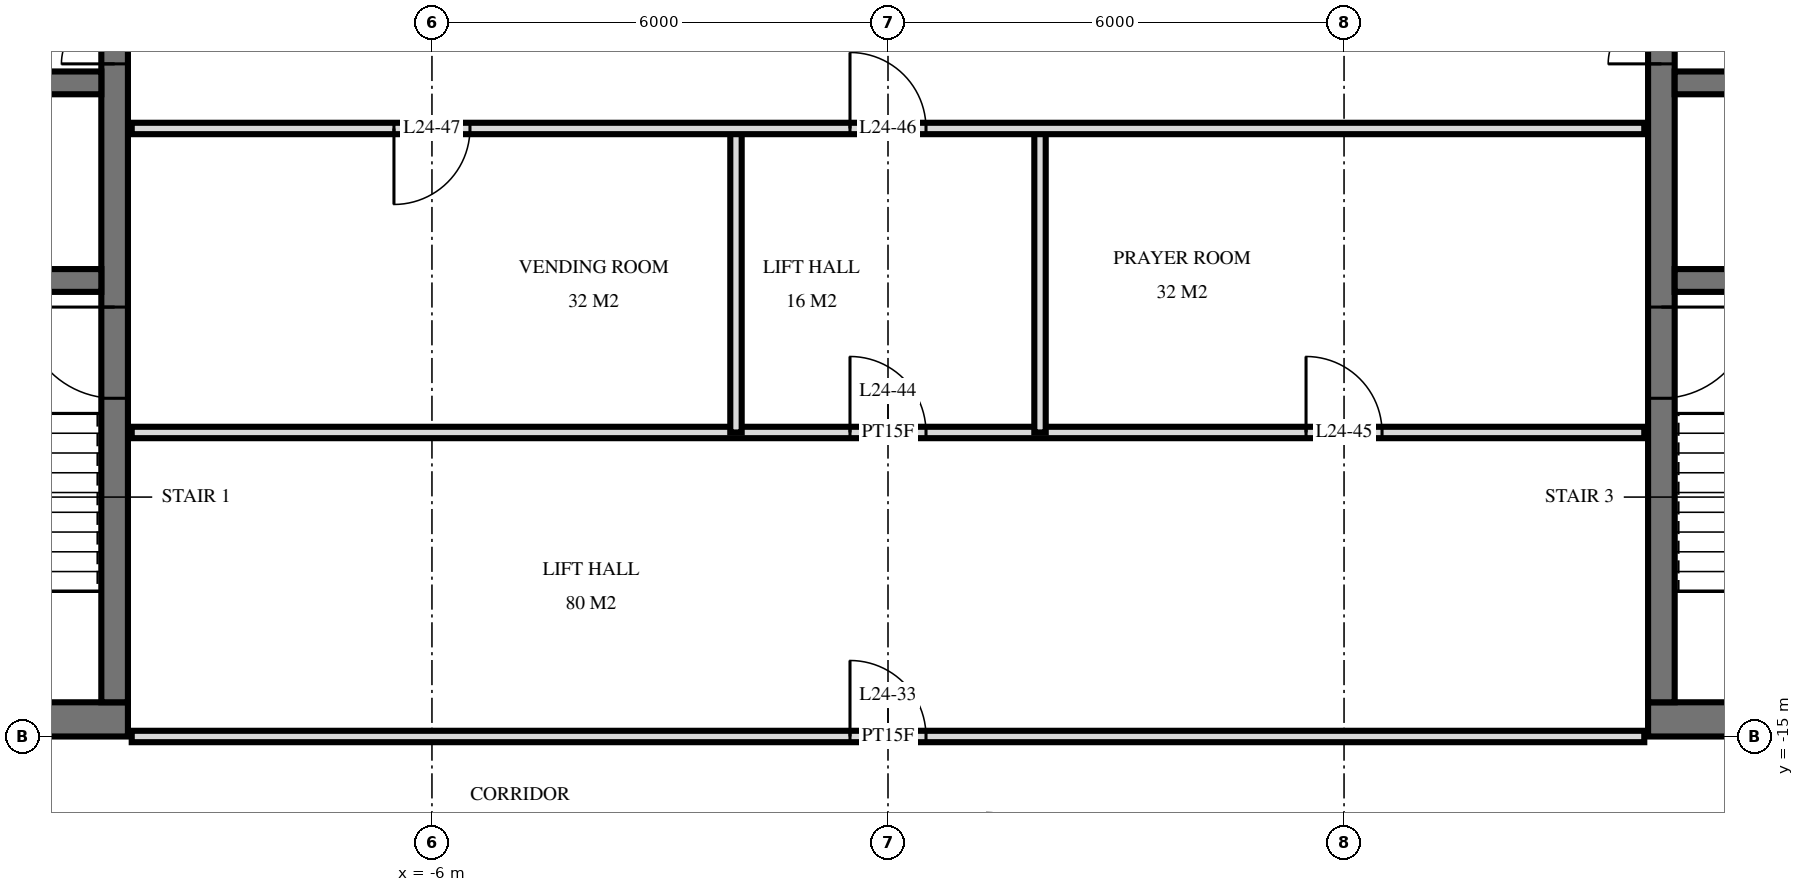
"""IFC4 building model, lengths in metres.
Left out: names, types, materials, properties, quantities, classifications, styles, units other than length and angle.
Written with IfcOpenShell. Run it as: python <this file> out.ifc"""

import sys

from ifc_helpers import new_model, si_unit, direction, frame, frame_2d, origin, place, context, subcontext, project, spatial, rectangle, extrude, element, fill, save


model = new_model("IFC4")
c1 = context("Model", 3, precision=1e-05, world=origin(), true_north=direction((0.0, 1.0)))
c2 = subcontext(c1, "Body", "Model", "MODEL_VIEW")
j1 = project(units=[si_unit("LENGTHUNIT", "METRE"), si_unit("PLANEANGLEUNIT", "RADIAN")], contexts=[c1])
p1 = place(None, origin())
s1 = spatial("IfcSite", under=j1, at=p1, CompositionType="ELEMENT")
p2 = place(p1, origin())
s2 = spatial("IfcBuilding", under=s1, at=p2, CompositionType="ELEMENT")
p3 = place(p2, frame((0.0, 0.0, 96.0)))
s3 = spatial("IfcBuildingStorey", under=s2, at=p3, CompositionType="ELEMENT", Elevation=96.0)
p4 = place(p3, frame((-29.5, -14.775, 0.0), z_axis=(0.0, 0.0, 1.0), x_axis=(1.0, 0.0, 0.0)))
e1 = element("IfcWall", 1, at=p4, inside=s3, PredefinedType="SHEAR", context=c2, shape_type="SweptSolid", body=[
    extrude(rectangle(XDim=19.5, YDim=0.45, at=frame_2d((9.75, 0.0))), origin(), (0.0, 0.0, 1.0), 3.6),
])
p5 = place(p4, frame((11.2, 0.0, 0.0)))
e2 = element("IfcOpeningElement", 2, at=p5, cuts=e1, PredefinedType="OPENING", context=c2, shape_type="SweptSolid", body=[
    extrude(rectangle(XDim=1.2, YDim=2.1, at=frame_2d((0.6, 1.05))), frame((0.0, 0.235, 0.0), z_axis=(0.0, -1.0, 0.0), x_axis=(1.0, 0.0, 0.0)), (0.0, 0.0, 1.0), 0.47),
])
p6 = place(p4, frame((14.25, 0.0, 0.0)))
e3 = element("IfcOpeningElement", 3, at=p6, cuts=e1, PredefinedType="OPENING", context=c2, shape_type="SweptSolid", body=[
    extrude(rectangle(XDim=1.1, YDim=2.1, at=frame_2d((0.55, 1.05))), frame((0.0, 0.235, 0.0), z_axis=(0.0, -1.0, 0.0), x_axis=(1.0, 0.0, 0.0)), (0.0, 0.0, 1.0), 0.47),
])
p7 = place(p4, frame((8.5, 0.0, 0.0)))
e4 = element("IfcOpeningElement", 4, at=p7, cuts=e1, PredefinedType="OPENING", context=c2, shape_type="SweptSolid", body=[
    extrude(rectangle(XDim=0.9, YDim=2.1, at=frame_2d((0.45, 1.05))), frame((0.0, 0.235, 0.0), z_axis=(0.0, -1.0, 0.0), x_axis=(1.0, 0.0, 0.0)), (0.0, 0.0, 1.0), 0.47),
])
p8 = place(p4, frame((6.05, 0.0, 0.0)))
e5 = element("IfcOpeningElement", 5, at=p8, cuts=e1, PredefinedType="OPENING", context=c2, shape_type="SweptSolid", body=[
    extrude(rectangle(XDim=1.0, YDim=2.1, at=frame_2d((0.5, 1.05))), frame((0.0, 0.235, 0.0), z_axis=(0.0, -1.0, 0.0), x_axis=(1.0, 0.0, 0.0)), (0.0, 0.0, 1.0), 0.47),
])
p9 = place(p4, frame((3.413, 0.0, 0.0)))
e6 = element("IfcOpeningElement", 6, at=p9, cuts=e1, PredefinedType="OPENING", context=c2, shape_type="SweptSolid", body=[
    extrude(rectangle(XDim=1.0, YDim=2.1, at=frame_2d((0.5, 1.05))), frame((0.0, 0.235, 0.0), z_axis=(0.0, -1.0, 0.0), x_axis=(1.0, 0.0, 0.0)), (0.0, 0.0, 1.0), 0.47),
])
p10 = place(p4, frame((1.087, 0.0, 0.0)))
e7 = element("IfcOpeningElement", 7, at=p10, cuts=e1, PredefinedType="OPENING", context=c2, shape_type="SweptSolid", body=[
    extrude(rectangle(XDim=1.0, YDim=2.1, at=frame_2d((0.5, 1.05))), frame((0.0, 0.235, 0.0), z_axis=(0.0, -1.0, 0.0), x_axis=(1.0, 0.0, 0.0)), (0.0, 0.0, 1.0), 0.47),
])
p11 = place(p3, frame((-10.175, -14.55, 0.0), z_axis=(0.0, 0.0, 1.0), x_axis=(0.0, 1.0, 0.0)))
e8 = element("IfcWall", 8, at=p11, inside=s3, PredefinedType="SHEAR", context=c2, shape_type="SweptSolid", body=[
    extrude(rectangle(XDim=14.1, YDim=0.35, at=frame_2d((7.05, 0.0))), origin(), (0.0, 0.0, 1.0), 3.6),
])
p12 = place(p11, frame((8.4, 0.0, 0.0)))
e9 = element("IfcOpeningElement", 9, at=p12, cuts=e8, PredefinedType="OPENING", context=c2, shape_type="SweptSolid", body=[
    extrude(rectangle(XDim=1.4, YDim=2.4, at=frame_2d((0.7, 1.2))), frame((0.0, 0.185, 0.0), z_axis=(0.0, -1.0, 0.0), x_axis=(1.0, 0.0, 0.0)), (0.0, 0.0, 1.0), 0.37),
])
p13 = place(p11, frame((10.0, 0.0, 0.0)))
e10 = element("IfcOpeningElement", 10, at=p13, cuts=e8, PredefinedType="OPENING", context=c2, shape_type="SweptSolid", body=[
    extrude(rectangle(XDim=1.4, YDim=2.4, at=frame_2d((0.7, 1.2))), frame((0.0, 0.185, 0.0), z_axis=(0.0, -1.0, 0.0), x_axis=(1.0, 0.0, 0.0)), (0.0, 0.0, 1.0), 0.37),
])
p14 = place(p11, frame((4.0, 0.0, 0.0)))
e11 = element("IfcOpeningElement", 11, at=p14, cuts=e8, PredefinedType="OPENING", context=c2, shape_type="SweptSolid", body=[
    extrude(rectangle(XDim=1.2, YDim=2.1, at=frame_2d((0.6, 1.05))), frame((0.0, 0.185, 0.0), z_axis=(0.0, -1.0, 0.0), x_axis=(1.0, 0.0, 0.0)), (0.0, 0.0, 1.0), 0.37),
])
p15 = place(p3, frame((-29.05, -6.4, 0.0), z_axis=(0.0, 0.0, 1.0), x_axis=(1.0, 0.0, 0.0)))
e12 = element("IfcWall", 12, at=p15, inside=s3, PredefinedType="SHEAR", context=c2, shape_type="SweptSolid", body=[
    extrude(rectangle(XDim=18.7, YDim=0.3, at=frame_2d((9.35, 0.0))), origin(), (0.0, 0.0, 1.0), 3.6),
])
p16 = place(p15, frame((2.95, 0.0, 0.0)))
e13 = element("IfcOpeningElement", 13, at=p16, cuts=e12, PredefinedType="OPENING", context=c2, shape_type="SweptSolid", body=[
    extrude(rectangle(XDim=1.1, YDim=2.1, at=frame_2d((0.55, 1.05))), frame((0.0, 0.16, 0.0), z_axis=(0.0, -1.0, 0.0), x_axis=(1.0, 0.0, 0.0)), (0.0, 0.0, 1.0), 0.32),
])
p17 = place(p15, frame((0.55, 0.0, 0.0)))
e14 = element("IfcOpeningElement", 14, at=p17, cuts=e12, PredefinedType="OPENING", context=c2, shape_type="SweptSolid", body=[
    extrude(rectangle(XDim=1.1, YDim=2.1, at=frame_2d((0.55, 1.05))), frame((0.0, 0.16, 0.0), z_axis=(0.0, -1.0, 0.0), x_axis=(1.0, 0.0, 0.0)), (0.0, 0.0, 1.0), 0.32),
])
p18 = place(p15, frame((10.8, 0.0, 0.0)))
e15 = element("IfcOpeningElement", 15, at=p18, cuts=e12, PredefinedType="OPENING", context=c2, shape_type="SweptSolid", body=[
    extrude(rectangle(XDim=1.1, YDim=2.1, at=frame_2d((0.55, 1.05))), frame((0.0, 0.16, 0.0), z_axis=(0.0, -1.0, 0.0), x_axis=(1.0, 0.0, 0.0)), (0.0, 0.0, 1.0), 0.32),
])
p19 = place(p15, frame((5.6, 0.0, 0.0)))
e16 = element("IfcOpeningElement", 16, at=p19, cuts=e12, PredefinedType="OPENING", context=c2, shape_type="SweptSolid", body=[
    extrude(rectangle(XDim=1.0, YDim=2.1, at=frame_2d((0.5, 1.05))), frame((0.0, 0.16, 0.0), z_axis=(0.0, -1.0, 0.0), x_axis=(1.0, 0.0, 0.0)), (0.0, 0.0, 1.0), 0.32),
])
p20 = place(p3, frame((-29.05, -9.0, 0.0), z_axis=(0.0, 0.0, 1.0), x_axis=(1.0, 0.0, 0.0)))
e17 = element("IfcWall", 17, at=p20, inside=s3, PredefinedType="SHEAR", context=c2, shape_type="SweptSolid", body=[
    extrude(rectangle(XDim=18.7, YDim=0.3, at=frame_2d((9.35, 0.0))), origin(), (0.0, 0.0, 1.0), 3.6),
])
p21 = place(p20, frame((13.8, 0.0, 0.0)))
e18 = element("IfcOpeningElement", 18, at=p21, cuts=e17, PredefinedType="OPENING", context=c2, shape_type="SweptSolid", body=[
    extrude(rectangle(XDim=1.1, YDim=2.1, at=frame_2d((0.55, 1.05))), frame((0.0, 0.16, 0.0), z_axis=(0.0, -1.0, 0.0), x_axis=(1.0, 0.0, 0.0)), (0.0, 0.0, 1.0), 0.32),
])
p22 = place(p3, frame((10.0, -14.775, 0.0), z_axis=(0.0, 0.0, 1.0), x_axis=(1.0, 0.0, 0.0)))
e19 = element("IfcWall", 19, at=p22, inside=s3, PredefinedType="SHEAR", context=c2, shape_type="SweptSolid", body=[
    extrude(rectangle(XDim=19.5, YDim=0.45, at=frame_2d((9.75, 0.0))), origin(), (0.0, 0.0, 1.0), 3.6),
])
p23 = place(p22, frame((7.1, 0.0, 0.0)))
e20 = element("IfcOpeningElement", 20, at=p23, cuts=e19, PredefinedType="OPENING", context=c2, shape_type="SweptSolid", body=[
    extrude(rectangle(XDim=1.2, YDim=2.1, at=frame_2d((0.6, 1.05))), frame((0.0, 0.235, 0.0), z_axis=(0.0, -1.0, 0.0), x_axis=(1.0, 0.0, 0.0)), (0.0, 0.0, 1.0), 0.47),
])
p24 = place(p22, frame((4.15, 0.0, 0.0)))
e21 = element("IfcOpeningElement", 21, at=p24, cuts=e19, PredefinedType="OPENING", context=c2, shape_type="SweptSolid", body=[
    extrude(rectangle(XDim=1.1, YDim=2.1, at=frame_2d((0.55, 1.05))), frame((0.0, 0.235, 0.0), z_axis=(0.0, -1.0, 0.0), x_axis=(1.0, 0.0, 0.0)), (0.0, 0.0, 1.0), 0.47),
])
p25 = place(p22, frame((10.1, 0.0, 0.0)))
e22 = element("IfcOpeningElement", 22, at=p25, cuts=e19, PredefinedType="OPENING", context=c2, shape_type="SweptSolid", body=[
    extrude(rectangle(XDim=0.9, YDim=2.1, at=frame_2d((0.45, 1.05))), frame((0.0, 0.235, 0.0), z_axis=(0.0, -1.0, 0.0), x_axis=(1.0, 0.0, 0.0)), (0.0, 0.0, 1.0), 0.47),
])
p26 = place(p22, frame((12.45, 0.0, 0.0)))
e23 = element("IfcOpeningElement", 23, at=p26, cuts=e19, PredefinedType="OPENING", context=c2, shape_type="SweptSolid", body=[
    extrude(rectangle(XDim=1.0, YDim=2.1, at=frame_2d((0.5, 1.05))), frame((0.0, 0.235, 0.0), z_axis=(0.0, -1.0, 0.0), x_axis=(1.0, 0.0, 0.0)), (0.0, 0.0, 1.0), 0.47),
])
p27 = place(p22, frame((15.087, 0.0, 0.0)))
e24 = element("IfcOpeningElement", 24, at=p27, cuts=e19, PredefinedType="OPENING", context=c2, shape_type="SweptSolid", body=[
    extrude(rectangle(XDim=1.0, YDim=2.1, at=frame_2d((0.5, 1.05))), frame((0.0, 0.235, 0.0), z_axis=(0.0, -1.0, 0.0), x_axis=(1.0, 0.0, 0.0)), (0.0, 0.0, 1.0), 0.47),
])
p28 = place(p22, frame((17.413, 0.0, 0.0)))
e25 = element("IfcOpeningElement", 25, at=p28, cuts=e19, PredefinedType="OPENING", context=c2, shape_type="SweptSolid", body=[
    extrude(rectangle(XDim=1.0, YDim=2.1, at=frame_2d((0.5, 1.05))), frame((0.0, 0.235, 0.0), z_axis=(0.0, -1.0, 0.0), x_axis=(1.0, 0.0, 0.0)), (0.0, 0.0, 1.0), 0.47),
])
p29 = place(p3, frame((10.175, -14.55, 0.0), z_axis=(0.0, 0.0, 1.0), x_axis=(0.0, 1.0, 0.0)))
e26 = element("IfcWall", 26, at=p29, inside=s3, PredefinedType="SHEAR", context=c2, shape_type="SweptSolid", body=[
    extrude(rectangle(XDim=14.1, YDim=0.35, at=frame_2d((7.05, 0.0))), origin(), (0.0, 0.0, 1.0), 3.6),
])
p30 = place(p29, frame((8.4, 0.0, 0.0)))
e27 = element("IfcOpeningElement", 27, at=p30, cuts=e26, PredefinedType="OPENING", context=c2, shape_type="SweptSolid", body=[
    extrude(rectangle(XDim=1.4, YDim=2.4, at=frame_2d((0.7, 1.2))), frame((0.0, 0.185, 0.0), z_axis=(0.0, -1.0, 0.0), x_axis=(1.0, 0.0, 0.0)), (0.0, 0.0, 1.0), 0.37),
])
p31 = place(p29, frame((10.0, 0.0, 0.0)))
e28 = element("IfcOpeningElement", 28, at=p31, cuts=e26, PredefinedType="OPENING", context=c2, shape_type="SweptSolid", body=[
    extrude(rectangle(XDim=1.4, YDim=2.4, at=frame_2d((0.7, 1.2))), frame((0.0, 0.185, 0.0), z_axis=(0.0, -1.0, 0.0), x_axis=(1.0, 0.0, 0.0)), (0.0, 0.0, 1.0), 0.37),
])
p32 = place(p29, frame((4.0, 0.0, 0.0)))
e29 = element("IfcOpeningElement", 29, at=p32, cuts=e26, PredefinedType="OPENING", context=c2, shape_type="SweptSolid", body=[
    extrude(rectangle(XDim=1.2, YDim=2.1, at=frame_2d((0.6, 1.05))), frame((0.0, 0.185, 0.0), z_axis=(0.0, -1.0, 0.0), x_axis=(1.0, 0.0, 0.0)), (0.0, 0.0, 1.0), 0.37),
])
p33 = place(p3, frame((10.35, -6.4, 0.0), z_axis=(0.0, 0.0, 1.0), x_axis=(1.0, 0.0, 0.0)))
e30 = element("IfcWall", 30, at=p33, inside=s3, PredefinedType="SHEAR", context=c2, shape_type="SweptSolid", body=[
    extrude(rectangle(XDim=18.7, YDim=0.3, at=frame_2d((9.35, 0.0))), origin(), (0.0, 0.0, 1.0), 3.6),
])
p34 = place(p33, frame((14.65, 0.0, 0.0)))
e31 = element("IfcOpeningElement", 31, at=p34, cuts=e30, PredefinedType="OPENING", context=c2, shape_type="SweptSolid", body=[
    extrude(rectangle(XDim=1.1, YDim=2.1, at=frame_2d((0.55, 1.05))), frame((0.0, 0.16, 0.0), z_axis=(0.0, -1.0, 0.0), x_axis=(1.0, 0.0, 0.0)), (0.0, 0.0, 1.0), 0.32),
])
p35 = place(p33, frame((17.05, 0.0, 0.0)))
e32 = element("IfcOpeningElement", 32, at=p35, cuts=e30, PredefinedType="OPENING", context=c2, shape_type="SweptSolid", body=[
    extrude(rectangle(XDim=1.1, YDim=2.1, at=frame_2d((0.55, 1.05))), frame((0.0, 0.16, 0.0), z_axis=(0.0, -1.0, 0.0), x_axis=(1.0, 0.0, 0.0)), (0.0, 0.0, 1.0), 0.32),
])
p36 = place(p33, frame((6.8, 0.0, 0.0)))
e33 = element("IfcOpeningElement", 33, at=p36, cuts=e30, PredefinedType="OPENING", context=c2, shape_type="SweptSolid", body=[
    extrude(rectangle(XDim=1.1, YDim=2.1, at=frame_2d((0.55, 1.05))), frame((0.0, 0.16, 0.0), z_axis=(0.0, -1.0, 0.0), x_axis=(1.0, 0.0, 0.0)), (0.0, 0.0, 1.0), 0.32),
])
p37 = place(p33, frame((12.1, 0.0, 0.0)))
e34 = element("IfcOpeningElement", 34, at=p37, cuts=e30, PredefinedType="OPENING", context=c2, shape_type="SweptSolid", body=[
    extrude(rectangle(XDim=1.0, YDim=2.1, at=frame_2d((0.5, 1.05))), frame((0.0, 0.16, 0.0), z_axis=(0.0, -1.0, 0.0), x_axis=(1.0, 0.0, 0.0)), (0.0, 0.0, 1.0), 0.32),
])
p38 = place(p3, frame((10.35, -9.0, 0.0), z_axis=(0.0, 0.0, 1.0), x_axis=(1.0, 0.0, 0.0)))
e35 = element("IfcWall", 35, at=p38, inside=s3, PredefinedType="SHEAR", context=c2, shape_type="SweptSolid", body=[
    extrude(rectangle(XDim=18.7, YDim=0.3, at=frame_2d((9.35, 0.0))), origin(), (0.0, 0.0, 1.0), 3.6),
])
p39 = place(p38, frame((3.8, 0.0, 0.0)))
e36 = element("IfcOpeningElement", 36, at=p39, cuts=e35, PredefinedType="OPENING", context=c2, shape_type="SweptSolid", body=[
    extrude(rectangle(XDim=1.1, YDim=2.1, at=frame_2d((0.55, 1.05))), frame((0.0, 0.16, 0.0), z_axis=(0.0, -1.0, 0.0), x_axis=(1.0, 0.0, 0.0)), (0.0, 0.0, 1.0), 0.32),
])
for number, where, z_axis, x_axis in (
    (37, (2.0, -11.0, 0.0), (0.0, 0.0, 1.0), (0.0, 1.0, 0.0)),
    (38, (-2.0, -11.0, 0.0), (0.0, 0.0, 1.0), (0.0, 1.0, 0.0)),
):
    element("IfcWall", number, at=place(p3, frame(where, z_axis=z_axis, x_axis=x_axis)), inside=s3, PredefinedType="PARTITIONING", context=c2, shape_type="SweptSolid", body=[
        extrude(rectangle(XDim=4.0, YDim=0.15, at=frame_2d((2.0, 0.0))), origin(), (0.0, 0.0, 1.0), 3.32),
    ])
p40 = place(p3, frame((-9.95, -15.0, 0.0), z_axis=(0.0, 0.0, 1.0), x_axis=(1.0, 0.0, 0.0)))
e39 = element("IfcWall", 39, at=p40, inside=s3, PredefinedType="PARTITIONING", context=c2, shape_type="SweptSolid", body=[
    extrude(rectangle(XDim=19.9, YDim=0.15, at=frame_2d((9.95, 0.0))), origin(), (0.0, 0.0, 1.0), 2.684),
])
p41 = place(p40, frame((9.45, 0.0, 0.0)))
e40 = element("IfcOpeningElement", 40, at=p41, cuts=e39, PredefinedType="OPENING", context=c2, shape_type="SweptSolid", body=[
    extrude(rectangle(XDim=1.0, YDim=2.1, at=frame_2d((0.5, 1.05))), frame((0.0, 0.085, 0.0), z_axis=(0.0, -1.0, 0.0), x_axis=(1.0, 0.0, 0.0)), (0.0, 0.0, 1.0), 0.17),
])
p42 = place(p3, frame((-9.95, -11.0, 0.0), z_axis=(0.0, 0.0, 1.0), x_axis=(1.0, 0.0, 0.0)))
e41 = element("IfcWall", 41, at=p42, inside=s3, PredefinedType="PARTITIONING", context=c2, shape_type="SweptSolid", body=[
    extrude(rectangle(XDim=19.9, YDim=0.15, at=frame_2d((9.95, 0.0))), origin(), (0.0, 0.0, 1.0), 3.32),
])
p43 = place(p42, frame((9.45, 0.0, 0.0)))
e42 = element("IfcOpeningElement", 42, at=p43, cuts=e41, PredefinedType="OPENING", context=c2, shape_type="SweptSolid", body=[
    extrude(rectangle(XDim=1.0, YDim=2.1, at=frame_2d((0.5, 1.05))), frame((0.0, 0.085, 0.0), z_axis=(0.0, -1.0, 0.0), x_axis=(1.0, 0.0, 0.0)), (0.0, 0.0, 1.0), 0.17),
])
p44 = place(p42, frame((15.45, 0.0, 0.0)))
e43 = element("IfcOpeningElement", 43, at=p44, cuts=e41, PredefinedType="OPENING", context=c2, shape_type="SweptSolid", body=[
    extrude(rectangle(XDim=1.0, YDim=2.1, at=frame_2d((0.5, 1.05))), frame((0.0, 0.085, 0.0), z_axis=(0.0, -1.0, 0.0), x_axis=(1.0, 0.0, 0.0)), (0.0, 0.0, 1.0), 0.17),
])
p45 = place(p3, frame((-9.95, -7.0, 0.0), z_axis=(0.0, 0.0, 1.0), x_axis=(1.0, 0.0, 0.0)))
e44 = element("IfcWall", 44, at=p45, inside=s3, PredefinedType="PARTITIONING", context=c2, shape_type="SweptSolid", body=[
    extrude(rectangle(XDim=19.9, YDim=0.15, at=frame_2d((9.95, 0.0))), origin(), (0.0, 0.0, 1.0), 3.32),
])
p46 = place(p45, frame((9.45, 0.0, 0.0)))
e45 = element("IfcOpeningElement", 45, at=p46, cuts=e44, PredefinedType="OPENING", context=c2, shape_type="SweptSolid", body=[
    extrude(rectangle(XDim=1.0, YDim=2.1, at=frame_2d((0.5, 1.05))), frame((0.0, 0.085, 0.0), z_axis=(0.0, -1.0, 0.0), x_axis=(1.0, 0.0, 0.0)), (0.0, 0.0, 1.0), 0.17),
])
p47 = place(p45, frame((3.45, 0.0, 0.0)))
e46 = element("IfcOpeningElement", 46, at=p47, cuts=e44, PredefinedType="OPENING", context=c2, shape_type="SweptSolid", body=[
    extrude(rectangle(XDim=1.0, YDim=2.1, at=frame_2d((0.5, 1.05))), frame((0.0, 0.085, 0.0), z_axis=(0.0, -1.0, 0.0), x_axis=(1.0, 0.0, 0.0)), (0.0, 0.0, 1.0), 0.17),
])
p48 = place(p12, origin())
e47 = element("IfcDoor", 47, at=p48, inside=s3, OperationType="DOUBLE_DOOR_SINGLE_SWING", PredefinedType="DOOR", context=c2, shape_type="SweptSolid", body=[
    extrude(rectangle(XDim=1.4, YDim=2.4, at=frame_2d((0.7, 1.2))), frame((0.0, 0.025, 0.0), z_axis=(0.0, -1.0, 0.0), x_axis=(1.0, 0.0, 0.0)), (0.0, 0.0, 1.0), 0.05),
])
fill(e9, e47)
p49 = place(p14, origin())
e48 = element("IfcDoor", 48, at=p49, inside=s3, OperationType="SINGLE_SWING_LEFT", PredefinedType="DOOR", context=c2, shape_type="SweptSolid", body=[
    extrude(rectangle(XDim=1.2, YDim=2.1, at=frame_2d((0.6, 1.05))), frame((0.0, 0.025, 0.0), z_axis=(0.0, -1.0, 0.0), x_axis=(1.0, 0.0, 0.0)), (0.0, 0.0, 1.0), 0.05),
])
fill(e11, e48)
p50 = place(p30, origin())
e49 = element("IfcDoor", 49, at=p50, inside=s3, OperationType="DOUBLE_DOOR_SINGLE_SWING", PredefinedType="DOOR", context=c2, shape_type="SweptSolid", body=[
    extrude(rectangle(XDim=1.4, YDim=2.4, at=frame_2d((0.7, 1.2))), frame((0.0, 0.025, 0.0), z_axis=(0.0, -1.0, 0.0), x_axis=(1.0, 0.0, 0.0)), (0.0, 0.0, 1.0), 0.05),
])
fill(e27, e49)
p51 = place(p32, frame((0.6, 0.0, 0.0), z_axis=(0.0, 0.0, 1.0), x_axis=(-1.0, 0.0, 0.0)))
e50 = element("IfcDoor", 50, at=p51, inside=s3, OperationType="SINGLE_SWING_RIGHT", PredefinedType="DOOR", context=c2, shape_type="SweptSolid", body=[
    extrude(rectangle(XDim=1.2, YDim=2.1, at=frame_2d((0.0, 1.05))), frame((0.0, -0.025, 0.0), z_axis=(0.0, 1.0, 0.0), x_axis=(-1.0, 0.0, 0.0)), (0.0, 0.0, 1.0), 0.05),
])
fill(e29, e50)
p52 = place(p41, origin())
e51 = element("IfcDoor", 51, at=p52, inside=s3, OperationType="SINGLE_SWING_RIGHT", PredefinedType="DOOR", context=c2, shape_type="SweptSolid", body=[
    extrude(rectangle(XDim=1.0, YDim=2.1, at=frame_2d((0.5, 1.05))), frame((0.0, 0.025, 0.0), z_axis=(0.0, -1.0, 0.0), x_axis=(1.0, 0.0, 0.0)), (0.0, 0.0, 1.0), 0.05),
])
fill(e40, e51)
p53 = place(p43, origin())
e52 = element("IfcDoor", 52, at=p53, inside=s3, OperationType="SINGLE_SWING_RIGHT", PredefinedType="DOOR", context=c2, shape_type="SweptSolid", body=[
    extrude(rectangle(XDim=1.0, YDim=2.1, at=frame_2d((0.5, 1.05))), frame((0.0, 0.025, 0.0), z_axis=(0.0, -1.0, 0.0), x_axis=(1.0, 0.0, 0.0)), (0.0, 0.0, 1.0), 0.05),
])
fill(e42, e52)
p54 = place(p44, origin())
e53 = element("IfcDoor", 53, at=p54, inside=s3, OperationType="SINGLE_SWING_RIGHT", PredefinedType="DOOR", context=c2, shape_type="SweptSolid", body=[
    extrude(rectangle(XDim=1.0, YDim=2.1, at=frame_2d((0.5, 1.05))), frame((0.0, 0.025, 0.0), z_axis=(0.0, -1.0, 0.0), x_axis=(1.0, 0.0, 0.0)), (0.0, 0.0, 1.0), 0.05),
])
fill(e43, e53)
p55 = place(p46, origin())
e54 = element("IfcDoor", 54, at=p55, inside=s3, OperationType="SINGLE_SWING_RIGHT", PredefinedType="DOOR", context=c2, shape_type="SweptSolid", body=[
    extrude(rectangle(XDim=1.0, YDim=2.1, at=frame_2d((0.5, 1.05))), frame((0.0, 0.025, 0.0), z_axis=(0.0, -1.0, 0.0), x_axis=(1.0, 0.0, 0.0)), (0.0, 0.0, 1.0), 0.05),
])
fill(e45, e54)
p56 = place(p47, frame((0.5, 0.0, 0.0), z_axis=(0.0, 0.0, 1.0), x_axis=(-1.0, 0.0, 0.0)))
e55 = element("IfcDoor", 55, at=p56, inside=s3, OperationType="SINGLE_SWING_LEFT", PredefinedType="DOOR", context=c2, shape_type="SweptSolid", body=[
    extrude(rectangle(XDim=1.0, YDim=2.1, at=frame_2d((0.0, 1.05))), frame((0.0, -0.025, 0.0), z_axis=(0.0, 1.0, 0.0), x_axis=(-1.0, 0.0, 0.0)), (0.0, 0.0, 1.0), 0.05),
])
fill(e46, e55)
save(model, sys.argv[1])
